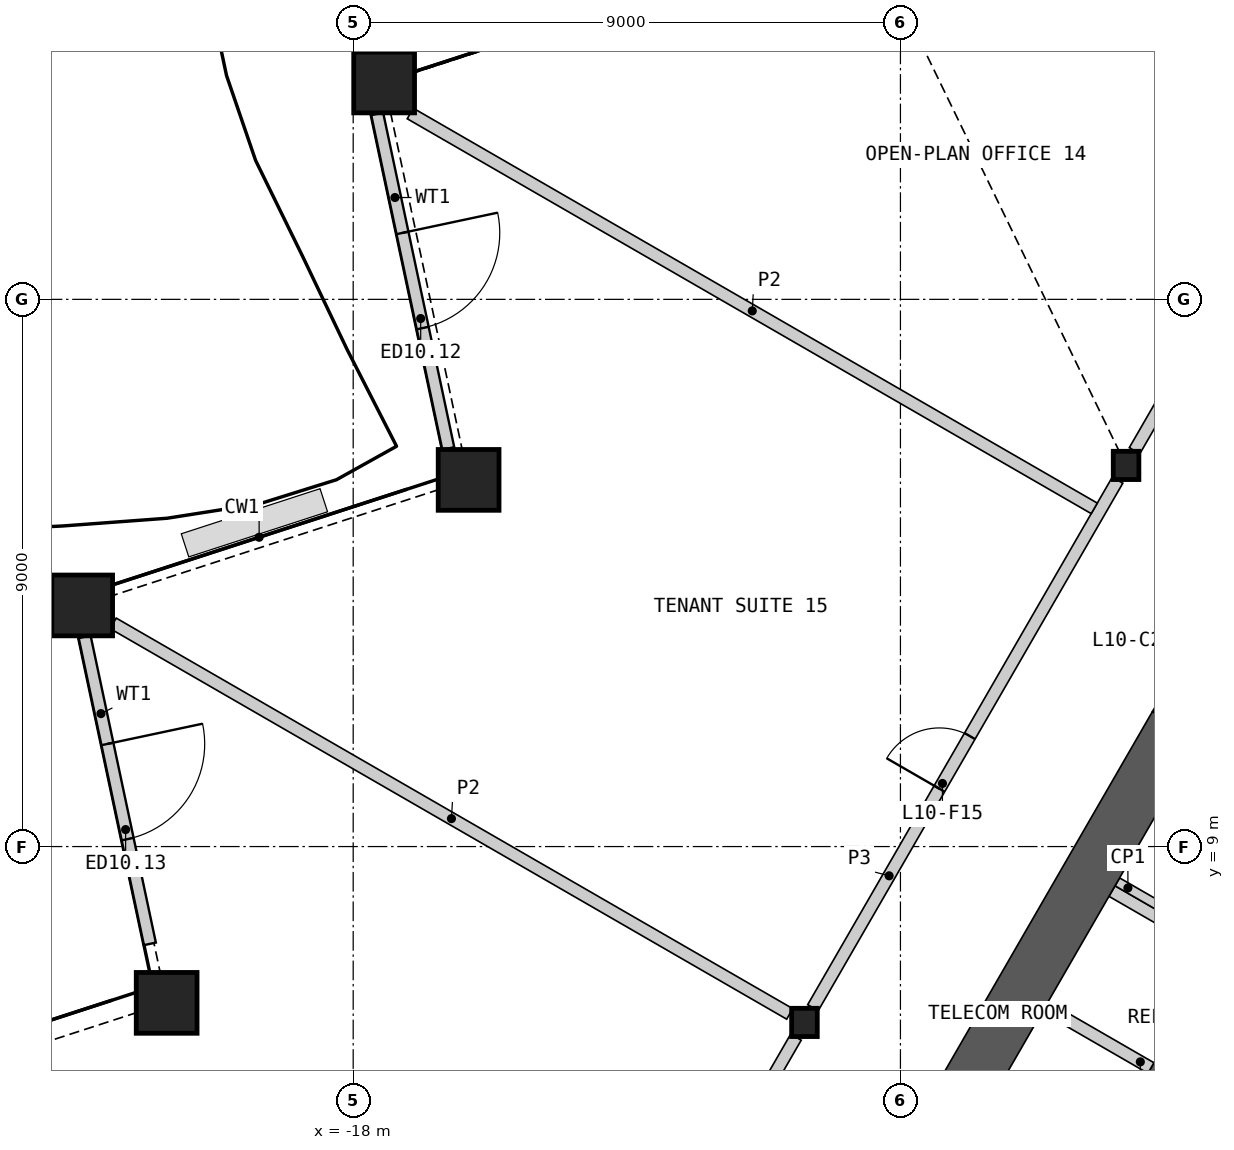
"""IFC4 building model, lengths in metres.
Left out: names, types, materials, properties, quantities, classifications, styles, units other than length and angle.
Written with IfcOpenShell. Run it as: python <this file> out.ifc"""

import sys

from ifc_helpers import new_model, si_unit, direction, frame, frame_2d, origin, origin_2d, place, context, subcontext, project, spatial, polyline, rectangle, hollow_rectangle, i_section, outline, extrude, element, fill, save


model = new_model("IFC4")
c1 = context("Model", 3, precision=1e-05, world=origin(), true_north=direction((0.0, 1.0)))
c2 = subcontext(c1, "Body", "Model", "MODEL_VIEW")
j1 = project(units=[si_unit("LENGTHUNIT", "METRE"), si_unit("PLANEANGLEUNIT", "RADIAN")], contexts=[c1])
p1 = place(None, origin())
s1 = spatial("IfcSite", under=j1, at=p1, CompositionType="ELEMENT")
p2 = place(p1, origin())
s2 = spatial("IfcBuilding", under=s1, at=p2, CompositionType="ELEMENT")
p3 = place(p2, frame((0.0, 0.0, 51.0)))
s3 = spatial("IfcBuildingStorey", under=s2, at=p3, CompositionType="ELEMENT", Elevation=51.0)
for number, where, z_axis, x_axis in (
    (1, (-17.491, 21.567, 0.0), (0.0, 0.0, 1.0), (1.0, 0.0, 0.0)),
    (2, (-16.102, 15.031, 0.0), (0.0, 0.0, 1.0), (1.0, 0.0, 0.0)),
    (3, (-22.457, 12.966, 0.0), (0.0, 0.0, 1.0), (1.0, 0.0, 0.0)),
    (4, (-21.068, 6.429, 0.0), (0.0, 0.0, 1.0), (1.0, 0.0, 0.0)),
):
    element("IfcColumn", number, at=place(p3, frame(where, z_axis=z_axis, x_axis=x_axis)), inside=s3, PredefinedType="COLUMN", context=c2, shape_type="SweptSolid", body=[
        extrude(hollow_rectangle(XDim=1.0, YDim=1.0, WallThickness=0.07, at=origin_2d()), origin(), (0.0, 0.0, 1.0), 4.2),
    ])
for number, where, z_axis, x_axis in (
    (5, (-5.289, 15.269, 0.0), (0.0, 0.0, 1.0), (1.0, 0.0, 0.0)),
    (6, (-10.578, 6.107, 0.0), (0.0, 0.0, 1.0), (1.0, 0.0, 0.0)),
):
    element("IfcColumn", number, at=place(p3, frame(where, z_axis=z_axis, x_axis=x_axis)), inside=s3, PredefinedType="COLUMN", context=c2, shape_type="SweptSolid", body=[
        extrude(i_section(OverallWidth=0.421, OverallDepth=0.465, WebThickness=0.045, FlangeThickness=0.072, at=origin_2d()), origin(), (0.0, 0.0, 1.0), 4.2),
    ])
p4 = place(p3, frame((-17.605, 21.051, 0.0), z_axis=(0.0, 0.0, 1.0), x_axis=(0.207901831982, -0.978149696242, 0.0)))
e7 = element("IfcWall", 7, at=p4, inside=s3, PredefinedType="SOLIDWALL", context=c2, shape_type="SweptSolid", body=[
    extrude(rectangle(XDim=5.626, YDim=0.2, at=frame_2d((2.813, 0.0))), origin(), (0.0, 0.0, 1.0), 3.189),
])
p5 = place(p4, frame((2.001, 0.0, 0.0)))
e8 = element("IfcOpeningElement", 8, at=p5, cuts=e7, PredefinedType="OPENING", context=c2, shape_type="SweptSolid", body=[
    extrude(rectangle(XDim=1.6, YDim=2.4, at=frame_2d((0.8, 1.2))), frame((0.0, 0.11, 0.0), z_axis=(0.0, -1.0, 0.0), x_axis=(1.0, 0.0, 0.0)), (0.0, 0.0, 1.0), 0.22),
])
p6 = place(p3, frame((-22.416, 12.449, 0.0), z_axis=(0.0, 0.0, 1.0), x_axis=(0.207907400709, -0.978148512615, 0.0)))
e9 = element("IfcWall", 9, at=p6, inside=s3, PredefinedType="SOLIDWALL", context=c2, shape_type="SweptSolid", body=[
    extrude(rectangle(XDim=5.162, YDim=0.2, at=frame_2d((2.581, 0.0))), origin(), (0.0, 0.0, 1.0), 3.189),
])
p7 = place(p6, frame((1.8, 0.0, 0.0)))
e10 = element("IfcOpeningElement", 10, at=p7, cuts=e9, PredefinedType="OPENING", context=c2, shape_type="SweptSolid", body=[
    extrude(rectangle(XDim=1.6, YDim=2.4, at=frame_2d((0.8, 1.2))), frame((0.0, 0.11, 0.0), z_axis=(0.0, -1.0, 0.0), x_axis=(1.0, 0.0, 0.0)), (0.0, 0.0, 1.0), 0.22),
])
p8 = place(p3, origin())
e11 = element("IfcWall", 11, at=p8, inside=s3, PredefinedType="SHEAR", context=c2, shape_type="SweptSolid", body=[
    extrude(outline(polyline([(-2.76, 4.019), (-4.931, 5.272), (-4.831, 5.445), (-2.66, 4.192), (-2.76, 4.019)])), origin(), (0.0, 0.0, 1.0), 3.8),
])
p9 = place(p3, frame((-1.631, 5.776, 0.0), z_axis=(0.0, 0.0, 1.0), x_axis=(-0.499992876559, -0.866029516466, 0.0)))
e12 = element("IfcWall", 12, at=p9, inside=s3, PredefinedType="SOLIDWALL", context=c2, shape_type="SweptSolid", body=[
    extrude(rectangle(XDim=6.486, YDim=0.2, at=frame_2d((3.243, 0.0))), origin(), (0.0, 0.0, 1.0), 3.8),
])
p10 = place(p9, frame((0.437, 0.0, 0.0)))
e13 = element("IfcOpeningElement", 13, at=p10, cuts=e12, PredefinedType="OPENING", context=c2, shape_type="SweptSolid", body=[
    extrude(rectangle(XDim=0.9, YDim=2.1, at=frame_2d((0.45, 1.05))), frame((0.0, 0.11, 0.0), z_axis=(0.0, -1.0, 0.0), x_axis=(1.0, 0.0, 0.0)), (0.0, 0.0, 1.0), 0.22),
])
p11 = place(p9, frame((2.637, 0.0, 0.0)))
e14 = element("IfcOpeningElement", 14, at=p11, cuts=e12, PredefinedType="OPENING", context=c2, shape_type="SweptSolid", body=[
    extrude(rectangle(XDim=0.9, YDim=2.1, at=frame_2d((0.45, 1.05))), frame((0.0, 0.11, 0.0), z_axis=(0.0, -1.0, 0.0), x_axis=(1.0, 0.0, 0.0)), (0.0, 0.0, 1.0), 0.22),
])
p12 = place(p3, frame((-3.781, 7.263, 0.0), z_axis=(0.0, 0.0, 1.0), x_axis=(-0.865983199114, 0.50007309351, 0.0)))
e15 = element("IfcWall", 15, at=p12, inside=s3, PredefinedType="SHEAR", context=c2, shape_type="SweptSolid", body=[
    extrude(rectangle(XDim=2.009, YDim=0.2, at=frame_2d((1.004, 0.0))), origin(), (0.0, 0.0, 1.0), 3.8),
])
p13 = place(p3, frame((-4.881, 5.358, 0.0), z_axis=(0.0, 0.0, 1.0), x_axis=(-0.866035824272, 0.499981950752, 0.0)))
e16 = element("IfcWall", 16, at=p13, inside=s3, PredefinedType="SHEAR", context=c2, shape_type="SweptSolid", body=[
    extrude(rectangle(XDim=2.009, YDim=0.2, at=frame_2d((1.004, 0.0))), origin(), (0.0, 0.0, 1.0), 3.8),
])
p14 = place(p3, frame((-3.693, 7.415, 0.0), z_axis=(0.0, 0.0, 1.0), x_axis=(-0.866035824272, 0.499981950752, 0.0)))
e17 = element("IfcWall", 17, at=p14, inside=s3, PredefinedType="PARTITIONING", context=c2, shape_type="SweptSolid", body=[
    extrude(rectangle(XDim=2.009, YDim=0.15, at=frame_2d((1.004, 0.0))), origin(), (0.0, 0.0, 1.0), 3.8),
])
p15 = place(p3, frame((-4.466, 10.995, 0.0), z_axis=(0.0, 0.0, 1.0), x_axis=(-0.500012427149, -0.866018228848, 0.0)))
e18 = element("IfcWall", 18, at=p15, inside=s3, PredefinedType="SHEAR", context=c2, shape_type="SweptSolid", body=[
    extrude(rectangle(XDim=7.409, YDim=0.9, at=frame_2d((3.705, 0.0))), origin(), (0.0, 0.0, 1.0), 3.8),
])
p16 = place(p3, frame((-3.365, 12.9, 0.0), z_axis=(0.0, 0.0, 1.0), x_axis=(-0.500077893725, -0.86598042715, 0.0)))
e19 = element("IfcWall", 19, at=p16, inside=s3, PredefinedType="SHEAR", context=c2, shape_type="SweptSolid", body=[
    extrude(rectangle(XDim=2.2, YDim=0.9, at=frame_2d((1.1, 0.0))), origin(), (0.0, 0.0, 1.0), 3.8),
])
p17 = place(p16, frame((0.6, 0.0, 0.0)))
e20 = element("IfcOpeningElement", 20, at=p17, cuts=e19, PredefinedType="OPENING", context=c2, shape_type="SweptSolid", body=[
    extrude(rectangle(XDim=1.0, YDim=2.1, at=frame_2d((0.5, 1.05))), frame((0.0, 0.46, 0.0), z_axis=(0.0, -1.0, 0.0), x_axis=(1.0, 0.0, 0.0)), (0.0, 0.0, 1.0), 0.92),
])
p18 = place(p3, frame((-10.439, 6.35, 0.0), z_axis=(0.0, 0.0, 1.0), x_axis=(0.50001002959, 0.86601961312, 0.0)))
e21 = element("IfcWall", 21, at=p18, inside=s3, PredefinedType="PARTITIONING", context=c2, shape_type="SweptSolid", body=[
    extrude(rectangle(XDim=10.019, YDim=0.2, at=frame_2d((5.009, 0.0))), origin(), (0.0, 0.0, 1.0), 3.8),
])
p19 = place(p18, frame((4.159, 0.0, 0.0)))
e22 = element("IfcOpeningElement", 22, at=p19, cuts=e21, PredefinedType="OPENING", context=c2, shape_type="SweptSolid", body=[
    extrude(rectangle(XDim=1.0, YDim=2.1, at=frame_2d((0.5, 1.05))), frame((0.0, 0.11, 0.0), z_axis=(0.0, -1.0, 0.0), x_axis=(1.0, 0.0, 0.0)), (0.0, 0.0, 1.0), 0.22),
])
p20 = place(p3, frame((-15.728, -2.811, 0.0), z_axis=(0.0, 0.0, 1.0), x_axis=(0.49999175339, 0.866030164915, 0.0)))
e23 = element("IfcWall", 23, at=p20, inside=s3, PredefinedType="PARTITIONING", context=c2, shape_type="SweptSolid", body=[
    extrude(rectangle(XDim=10.019, YDim=0.2, at=frame_2d((5.009, 0.0))), origin(), (0.0, 0.0, 1.0), 3.8),
])
p21 = place(p20, frame((4.059, 0.0, 0.0)))
e24 = element("IfcOpeningElement", 24, at=p21, cuts=e23, PredefinedType="OPENING", context=c2, shape_type="SweptSolid", body=[
    extrude(rectangle(XDim=1.8, YDim=2.1, at=frame_2d((0.9, 1.05))), frame((0.0, 0.11, 0.0), z_axis=(0.0, -1.0, 0.0), x_axis=(1.0, 0.0, 0.0)), (0.0, 0.0, 1.0), 0.22),
])
p22 = place(p3, frame((-5.149, 15.511, 0.0), z_axis=(0.0, 0.0, 1.0), x_axis=(0.500001069878, 0.866024786089, 0.0)))
e25 = element("IfcWall", 25, at=p22, inside=s3, PredefinedType="PARTITIONING", context=c2, shape_type="SweptSolid", body=[
    extrude(rectangle(XDim=6.473, YDim=0.2, at=frame_2d((3.236, 0.0))), origin(), (0.0, 0.0, 1.0), 3.8),
])
p23 = place(p22, frame((2.686, 0.0, 0.0)))
e26 = element("IfcOpeningElement", 26, at=p23, cuts=e25, PredefinedType="OPENING", context=c2, shape_type="SweptSolid", body=[
    extrude(rectangle(XDim=1.0, YDim=2.1, at=frame_2d((0.5, 1.05))), frame((0.0, 0.11, 0.0), z_axis=(0.0, -1.0, 0.0), x_axis=(1.0, 0.0, 0.0)), (0.0, 0.0, 1.0), 0.22),
])
p24 = place(p3, frame((-12.674, 29.659, 0.0), z_axis=(0.0, 0.0, 1.0), x_axis=(0.778730857737, -0.627358152261, 0.0)))
e27 = element("IfcWall", 27, at=p24, inside=s3, PredefinedType="PARTITIONING", context=c2, shape_type="SweptSolid", body=[
    extrude(rectangle(XDim=13.654, YDim=0.2, at=frame_2d((6.827, 0.0))), origin(), (0.0, 0.0, 1.0), 2.885),
])
p25 = place(p3, frame((-17.061, 21.057, 0.0), z_axis=(0.0, 0.0, 1.0), x_axis=(0.866020631549, -0.500008265664, 0.0)))
e28 = element("IfcWall", 28, at=p25, inside=s3, PredefinedType="PARTITIONING", context=c2, shape_type="SweptSolid", body=[
    extrude(rectangle(XDim=12.989, YDim=0.2, at=frame_2d((6.495, 0.0))), origin(), (0.0, 0.0, 1.0), 2.885),
])
p26 = place(p3, frame((-21.947, 12.671, 0.0), z_axis=(0.0, 0.0, 1.0), x_axis=(0.866026729935, -0.499997703033, 0.0)))
e29 = element("IfcWall", 29, at=p26, inside=s3, PredefinedType="PARTITIONING", context=c2, shape_type="SweptSolid", body=[
    extrude(rectangle(XDim=12.848, YDim=0.2, at=frame_2d((6.424, 0.0))), origin(), (0.0, 0.0, 1.0), 2.885),
])
p27 = place(p5, origin())
e30 = element("IfcDoor", 30, at=p27, inside=s3, OperationType="DOUBLE_DOOR_SINGLE_SWING", PredefinedType="DOOR", context=c2, shape_type="SweptSolid", body=[
    extrude(rectangle(XDim=1.6, YDim=2.4, at=frame_2d((0.8, 1.2))), frame((0.0, 0.025, 0.0), z_axis=(0.0, -1.0, 0.0), x_axis=(1.0, 0.0, 0.0)), (0.0, 0.0, 1.0), 0.05),
])
fill(e8, e30)
p28 = place(p7, origin())
e31 = element("IfcDoor", 31, at=p28, inside=s3, OperationType="DOUBLE_DOOR_SINGLE_SWING", PredefinedType="DOOR", context=c2, shape_type="SweptSolid", body=[
    extrude(rectangle(XDim=1.6, YDim=2.4, at=frame_2d((0.8, 1.2))), frame((0.0, 0.025, 0.0), z_axis=(0.0, -1.0, 0.0), x_axis=(1.0, 0.0, 0.0)), (0.0, 0.0, 1.0), 0.05),
])
fill(e10, e31)
p29 = place(p19, origin())
e32 = element("IfcDoor", 32, at=p29, inside=s3, OperationType="SINGLE_SWING_LEFT", PredefinedType="DOOR", context=c2, shape_type="SweptSolid", body=[
    extrude(rectangle(XDim=1.0, YDim=2.1, at=frame_2d((0.5, 1.05))), frame((0.0, 0.025, 0.0), z_axis=(0.0, -1.0, 0.0), x_axis=(1.0, 0.0, 0.0)), (0.0, 0.0, 1.0), 0.05),
])
fill(e22, e32)
save(model, sys.argv[1])
